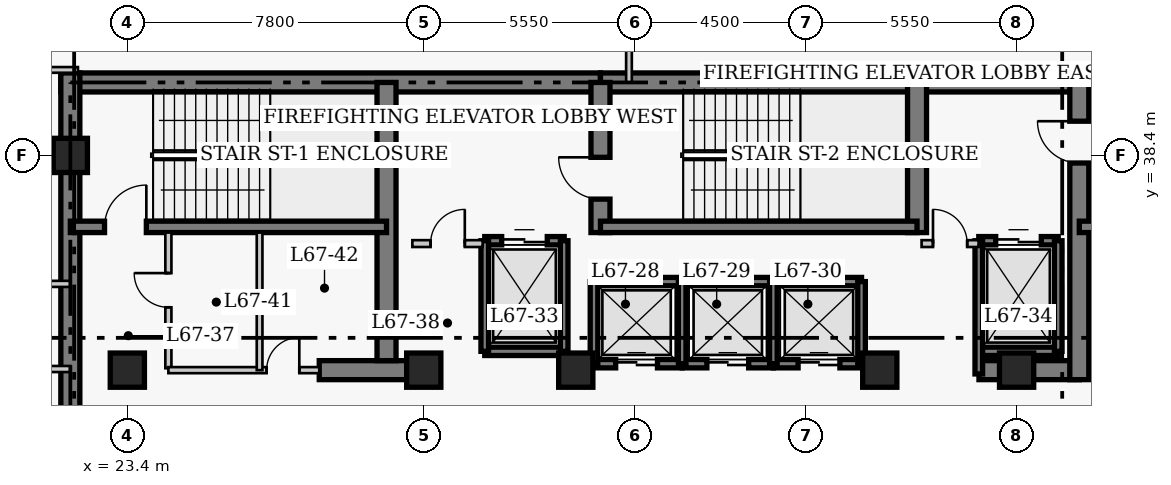
"""IFC4 building model, lengths in metres.
Left out: names, types, materials, properties, quantities, classifications, styles, units other than length and angle.
Written with IfcOpenShell. Run it as: python <this file> out.ifc"""

import sys

from ifc_helpers import new_model, si_unit, direction, frame, frame_2d, origin, origin_2d, place, context, subcontext, project, spatial, rectangle, extrude, element, fill, save


model = new_model("IFC4")
c1 = context("Model", 3, precision=1e-05, world=origin(), true_north=direction((0.0, 1.0)))
c2 = subcontext(c1, "Body", "Model", "MODEL_VIEW")
j1 = project(units=[si_unit("LENGTHUNIT", "METRE"), si_unit("PLANEANGLEUNIT", "RADIAN")], contexts=[c1])
p1 = place(None, origin())
s1 = spatial("IfcSite", under=j1, at=p1, CompositionType="ELEMENT")
p2 = place(p1, origin())
s2 = spatial("IfcBuilding", under=s1, at=p2, CompositionType="ELEMENT")
p3 = place(p2, frame((0.0, 0.0, 269.4)))
s3 = spatial("IfcBuildingStorey", under=s2, at=p3, CompositionType="ELEMENT", Elevation=269.4)
p4 = place(p3, frame((21.65, 40.32, 0.0), z_axis=(0.0, 0.0, 1.0), x_axis=(1.0, 0.0, 0.0)))
e1 = element("IfcWall", 1, at=p4, inside=s3, PredefinedType="SHEAR", context=c2, shape_type="SweptSolid", body=[
    extrude(rectangle(XDim=14.2, YDim=0.5, at=frame_2d((7.1, 0.0))), origin(), (0.0, 0.0, 1.0), 4.0),
])
p5 = place(p3, frame((35.85, 40.32, 0.0), z_axis=(0.0, 0.0, 1.0), x_axis=(1.0, 0.0, 0.0)))
e2 = element("IfcWall", 2, at=p5, inside=s3, PredefinedType="SHEAR", context=c2, shape_type="SweptSolid", body=[
    extrude(rectangle(XDim=12.6, YDim=0.5, at=frame_2d((6.3, 0.0))), origin(), (0.0, 0.0, 1.0), 4.0),
])
p6 = place(p3, frame((48.45, 40.32, 0.0), z_axis=(0.0, 0.0, 1.0), x_axis=(1.0, 0.0, 0.0)))
e3 = element("IfcWall", 3, at=p6, inside=s3, PredefinedType="SHEAR", context=c2, shape_type="SweptSolid", body=[
    extrude(rectangle(XDim=8.57, YDim=0.5, at=frame_2d((4.285, 0.0))), origin(), (0.0, 0.0, 1.0), 4.0),
])
p7 = place(p3, frame((21.9, 27.05, 0.0), z_axis=(0.0, 0.0, 1.0), x_axis=(0.0, 1.0, 0.0)))
e4 = element("IfcWall", 4, at=p7, inside=s3, PredefinedType="SHEAR", context=c2, shape_type="SweptSolid", body=[
    extrude(rectangle(XDim=13.52, YDim=0.5, at=frame_2d((6.76, 0.0))), origin(), (0.0, 0.0, 1.0), 4.0),
])
p8 = place(p3, frame((28.45, 32.75, 0.0), z_axis=(0.0, 0.0, 1.0), x_axis=(1.0, 0.0, 0.0)))
e5 = element("IfcWall", 5, at=p8, inside=s3, PredefinedType="SHEAR", context=c2, shape_type="SweptSolid", body=[
    extrude(rectangle(XDim=2.4, YDim=0.5, at=frame_2d((1.2, 0.0))), origin(), (0.0, 0.0, 1.0), 4.0),
])
p9 = place(p3, frame((45.81, 32.75, 0.0), z_axis=(0.0, 0.0, 1.0), x_axis=(1.0, 0.0, 0.0)))
e6 = element("IfcWall", 6, at=p9, inside=s3, PredefinedType="SHEAR", context=c2, shape_type="SweptSolid", body=[
    extrude(rectangle(XDim=2.64, YDim=0.5, at=frame_2d((1.32, 0.0))), origin(), (0.0, 0.0, 1.0), 4.0),
])
p10 = place(p3, frame((30.22, 33.0, 0.0), z_axis=(0.0, 0.0, 1.0), x_axis=(0.0, 1.0, 0.0)))
e7 = element("IfcWall", 7, at=p10, inside=s3, PredefinedType="SHEAR", context=c2, shape_type="SweptSolid", body=[
    extrude(rectangle(XDim=7.32, YDim=0.5, at=frame_2d((3.66, 0.0))), origin(), (0.0, 0.0, 1.0), 4.0),
])
p11 = place(p3, frame((35.85, 36.37, 0.0), z_axis=(0.0, 0.0, 1.0), x_axis=(0.0, 1.0, 0.0)))
e8 = element("IfcWall", 8, at=p11, inside=s3, PredefinedType="SHEAR", context=c2, shape_type="SweptSolid", body=[
    extrude(rectangle(XDim=3.95, YDim=0.5, at=frame_2d((1.975, 0.0))), origin(), (0.0, 0.0, 1.0), 4.0),
])
p12 = place(p11, frame((0.88, 0.0, 0.0)))
e9 = element("IfcOpeningElement", 9, at=p12, cuts=e8, PredefinedType="OPENING", context=c2, shape_type="SweptSolid", body=[
    extrude(rectangle(XDim=1.1, YDim=2.15, at=frame_2d((0.55, 1.075))), frame((0.0, 0.26, 0.0), z_axis=(0.0, -1.0, 0.0), x_axis=(1.0, 0.0, 0.0)), (0.0, 0.0, 1.0), 0.52),
])
p13 = place(p3, frame((44.18, 36.37, 0.0), z_axis=(0.0, 0.0, 1.0), x_axis=(0.0, 1.0, 0.0)))
e10 = element("IfcWall", 10, at=p13, inside=s3, PredefinedType="SHEAR", context=c2, shape_type="SweptSolid", body=[
    extrude(rectangle(XDim=3.95, YDim=0.5, at=frame_2d((1.975, 0.0))), origin(), (0.0, 0.0, 1.0), 4.0),
])
p14 = place(p3, frame((48.45, 32.5, 0.0), z_axis=(0.0, 0.0, 1.0), x_axis=(0.0, 1.0, 0.0)))
e11 = element("IfcWall", 11, at=p14, inside=s3, PredefinedType="SHEAR", context=c2, shape_type="SweptSolid", body=[
    extrude(rectangle(XDim=7.82, YDim=0.5, at=frame_2d((3.91, 0.0))), origin(), (0.0, 0.0, 1.0), 4.0),
])
p15 = place(p14, frame((5.7, 0.0, 0.0)))
e12 = element("IfcOpeningElement", 12, at=p15, cuts=e11, PredefinedType="OPENING", context=c2, shape_type="SweptSolid", body=[
    extrude(rectangle(XDim=1.1, YDim=2.15, at=frame_2d((0.55, 1.075))), frame((0.0, 0.26, 0.0), z_axis=(0.0, -1.0, 0.0), x_axis=(1.0, 0.0, 0.0)), (0.0, 0.0, 1.0), 0.52),
])
p16 = place(p3, frame((21.9, 36.52, 0.0), z_axis=(0.0, 0.0, 1.0), x_axis=(1.0, 0.0, 0.0)))
e13 = element("IfcWall", 13, at=p16, inside=s3, PredefinedType="SHEAR", context=c2, shape_type="SweptSolid", body=[
    extrude(rectangle(XDim=8.32, YDim=0.3, at=frame_2d((4.16, 0.0))), origin(), (0.0, 0.0, 1.0), 4.0),
])
p17 = place(p16, frame((0.9, 0.0, 0.0)))
e14 = element("IfcOpeningElement", 14, at=p17, cuts=e13, PredefinedType="OPENING", context=c2, shape_type="SweptSolid", body=[
    extrude(rectangle(XDim=1.1, YDim=2.15, at=frame_2d((0.55, 1.075))), frame((0.0, 0.16, 0.0), z_axis=(0.0, -1.0, 0.0), x_axis=(1.0, 0.0, 0.0)), (0.0, 0.0, 1.0), 0.32),
])
p18 = place(p3, frame((35.85, 36.52, 0.0), z_axis=(0.0, 0.0, 1.0), x_axis=(1.0, 0.0, 0.0)))
e15 = element("IfcWall", 15, at=p18, inside=s3, PredefinedType="SHEAR", context=c2, shape_type="SweptSolid", body=[
    extrude(rectangle(XDim=8.33, YDim=0.3, at=frame_2d((4.165, 0.0))), origin(), (0.0, 0.0, 1.0), 4.0),
])
p19 = place(p3, frame((48.45, 36.52, 0.0), z_axis=(0.0, 0.0, 1.0), x_axis=(1.0, 0.0, 0.0)))
e16 = element("IfcWall", 16, at=p19, inside=s3, PredefinedType="SHEAR", context=c2, shape_type="SweptSolid", body=[
    extrude(rectangle(XDim=8.32, YDim=0.3, at=frame_2d((4.16, 0.0))), origin(), (0.0, 0.0, 1.0), 4.0),
])
for number, where, z_axis, x_axis in (
    (17, (21.9, 38.4, 0.0), (0.0, 0.0, 1.0), (1.0, 0.0, 0.0)),
    (18, (23.4, 32.75, 0.0), (0.0, 0.0, 1.0), (1.0, 0.0, 0.0)),
    (19, (31.2, 32.75, 0.0), (0.0, 0.0, 1.0), (1.0, 0.0, 0.0)),
    (20, (35.2, 32.75, 0.0), (0.0, 0.0, 1.0), (1.0, 0.0, 0.0)),
    (21, (43.2, 32.75, 0.0), (0.0, 0.0, 1.0), (1.0, 0.0, 0.0)),
    (22, (46.8, 32.75, 0.0), (0.0, 0.0, 1.0), (1.0, 0.0, 0.0)),
):
    element("IfcColumn", number, at=place(p3, frame(where, z_axis=z_axis, x_axis=x_axis)), inside=s3, PredefinedType="COLUMN", context=c2, shape_type="SweptSolid", body=[
        extrude(rectangle(XDim=0.9, YDim=0.9, at=origin_2d()), origin(), (0.0, 0.0, 1.0), 4.0),
    ])
p20 = place(p3, frame((35.68, 35.08, 0.0), z_axis=(0.0, 0.0, 1.0), x_axis=(1.0, 0.0, 0.0)))
e23 = element("IfcWall", 23, at=p20, inside=s3, PredefinedType="SHEAR", context=c2, shape_type="SweptSolid", body=[
    extrude(rectangle(XDim=2.32, YDim=0.22, at=frame_2d((1.16, 0.0))), origin(), (0.0, 0.0, 1.0), 4.0),
])
p21 = place(p3, frame((35.68, 32.92, 0.0), z_axis=(0.0, 0.0, 1.0), x_axis=(1.0, 0.0, 0.0)))
e24 = element("IfcWall", 24, at=p21, inside=s3, PredefinedType="SHEAR", context=c2, shape_type="SweptSolid", body=[
    extrude(rectangle(XDim=2.32, YDim=0.22, at=frame_2d((1.16, 0.0))), origin(), (0.0, 0.0, 1.0), 4.0),
])
p22 = place(p21, frame((0.57, 0.0, 0.0)))
e25 = element("IfcOpeningElement", 25, at=p22, cuts=e24, PredefinedType="OPENING", context=c2, shape_type="SweptSolid", body=[
    extrude(rectangle(XDim=1.1, YDim=2.15, at=frame_2d((0.55, 1.075))), frame((0.0, 0.12, 0.0), z_axis=(0.0, -1.0, 0.0), x_axis=(1.0, 0.0, 0.0)), (0.0, 0.0, 1.0), 0.24),
])
p23 = place(p3, frame((35.68, 32.92, 0.0), z_axis=(0.0, 0.0, 1.0), x_axis=(0.0, 1.0, 0.0)))
e26 = element("IfcWall", 26, at=p23, inside=s3, PredefinedType="SHEAR", context=c2, shape_type="SweptSolid", body=[
    extrude(rectangle(XDim=2.16, YDim=0.2, at=frame_2d((1.08, 0.0))), origin(), (0.0, 0.0, 1.0), 4.0),
])
p24 = place(p3, frame((38.0, 35.08, 0.0), z_axis=(0.0, 0.0, 1.0), x_axis=(1.0, 0.0, 0.0)))
e27 = element("IfcWall", 27, at=p24, inside=s3, PredefinedType="SHEAR", context=c2, shape_type="SweptSolid", body=[
    extrude(rectangle(XDim=2.4, YDim=0.22, at=frame_2d((1.2, 0.0))), origin(), (0.0, 0.0, 1.0), 4.0),
])
p25 = place(p3, frame((38.0, 32.92, 0.0), z_axis=(0.0, 0.0, 1.0), x_axis=(1.0, 0.0, 0.0)))
e28 = element("IfcWall", 28, at=p25, inside=s3, PredefinedType="SHEAR", context=c2, shape_type="SweptSolid", body=[
    extrude(rectangle(XDim=2.4, YDim=0.22, at=frame_2d((1.2, 0.0))), origin(), (0.0, 0.0, 1.0), 4.0),
])
p26 = place(p25, frame((0.65, 0.0, 0.0)))
e29 = element("IfcOpeningElement", 29, at=p26, cuts=e28, PredefinedType="OPENING", context=c2, shape_type="SweptSolid", body=[
    extrude(rectangle(XDim=1.1, YDim=2.15, at=frame_2d((0.55, 1.075))), frame((0.0, 0.12, 0.0), z_axis=(0.0, -1.0, 0.0), x_axis=(1.0, 0.0, 0.0)), (0.0, 0.0, 1.0), 0.24),
])
p27 = place(p3, frame((38.0, 32.92, 0.0), z_axis=(0.0, 0.0, 1.0), x_axis=(0.0, 1.0, 0.0)))
e30 = element("IfcWall", 30, at=p27, inside=s3, PredefinedType="SHEAR", context=c2, shape_type="SweptSolid", body=[
    extrude(rectangle(XDim=2.16, YDim=0.2, at=frame_2d((1.08, 0.0))), origin(), (0.0, 0.0, 1.0), 4.0),
])
p28 = place(p3, frame((40.4, 35.08, 0.0), z_axis=(0.0, 0.0, 1.0), x_axis=(1.0, 0.0, 0.0)))
e31 = element("IfcWall", 31, at=p28, inside=s3, PredefinedType="SHEAR", context=c2, shape_type="SweptSolid", body=[
    extrude(rectangle(XDim=2.32, YDim=0.22, at=frame_2d((1.16, 0.0))), origin(), (0.0, 0.0, 1.0), 4.0),
])
p29 = place(p3, frame((40.4, 32.92, 0.0), z_axis=(0.0, 0.0, 1.0), x_axis=(1.0, 0.0, 0.0)))
e32 = element("IfcWall", 32, at=p29, inside=s3, PredefinedType="SHEAR", context=c2, shape_type="SweptSolid", body=[
    extrude(rectangle(XDim=2.32, YDim=0.22, at=frame_2d((1.16, 0.0))), origin(), (0.0, 0.0, 1.0), 4.0),
])
p30 = place(p29, frame((0.65, 0.0, 0.0)))
e33 = element("IfcOpeningElement", 33, at=p30, cuts=e32, PredefinedType="OPENING", context=c2, shape_type="SweptSolid", body=[
    extrude(rectangle(XDim=1.1, YDim=2.15, at=frame_2d((0.55, 1.075))), frame((0.0, 0.12, 0.0), z_axis=(0.0, -1.0, 0.0), x_axis=(1.0, 0.0, 0.0)), (0.0, 0.0, 1.0), 0.24),
])
for number, where, z_axis, x_axis in (
    (34, (40.4, 32.92, 0.0), (0.0, 0.0, 1.0), (0.0, 1.0, 0.0)),
    (35, (42.72, 32.92, 0.0), (0.0, 0.0, 1.0), (0.0, 1.0, 0.0)),
):
    element("IfcWall", number, at=place(p3, frame(where, z_axis=z_axis, x_axis=x_axis)), inside=s3, PredefinedType="SHEAR", context=c2, shape_type="SweptSolid", body=[
        extrude(rectangle(XDim=2.16, YDim=0.2, at=frame_2d((1.08, 0.0))), origin(), (0.0, 0.0, 1.0), 4.0),
    ])
p31 = place(p3, frame((32.805, 36.155, 0.0), z_axis=(0.0, 0.0, 1.0), x_axis=(1.0, 0.0, 0.0)))
e36 = element("IfcWall", 36, at=p31, inside=s3, PredefinedType="SHEAR", context=c2, shape_type="SweptSolid", body=[
    extrude(rectangle(XDim=2.09, YDim=0.22, at=frame_2d((1.045, 0.0))), origin(), (0.0, 0.0, 1.0), 4.0),
])
p32 = place(p31, frame((0.445, 0.0, 0.0)))
e37 = element("IfcOpeningElement", 37, at=p32, cuts=e36, PredefinedType="OPENING", context=c2, shape_type="SweptSolid", body=[
    extrude(rectangle(XDim=1.2, YDim=2.15, at=frame_2d((0.6, 1.075))), frame((0.0, 0.12, 0.0), z_axis=(0.0, -1.0, 0.0), x_axis=(1.0, 0.0, 0.0)), (0.0, 0.0, 1.0), 0.24),
])
p33 = place(p3, frame((32.805, 33.245, 0.0), z_axis=(0.0, 0.0, 1.0), x_axis=(1.0, 0.0, 0.0)))
e38 = element("IfcWall", 38, at=p33, inside=s3, PredefinedType="SHEAR", context=c2, shape_type="SweptSolid", body=[
    extrude(rectangle(XDim=2.09, YDim=0.22, at=frame_2d((1.045, 0.0))), origin(), (0.0, 0.0, 1.0), 4.0),
])
for number, where, z_axis, x_axis in (
    (39, (32.805, 33.245, 0.0), (0.0, 0.0, 1.0), (0.0, 1.0, 0.0)),
    (40, (34.895, 33.245, 0.0), (0.0, 0.0, 1.0), (0.0, 1.0, 0.0)),
):
    element("IfcWall", number, at=place(p3, frame(where, z_axis=z_axis, x_axis=x_axis)), inside=s3, PredefinedType="SHEAR", context=c2, shape_type="SweptSolid", body=[
        extrude(rectangle(XDim=2.91, YDim=0.2, at=frame_2d((1.455, 0.0))), origin(), (0.0, 0.0, 1.0), 4.0),
    ])
p34 = place(p3, frame((45.805, 36.155, 0.0), z_axis=(0.0, 0.0, 1.0), x_axis=(1.0, 0.0, 0.0)))
e41 = element("IfcWall", 41, at=p34, inside=s3, PredefinedType="SHEAR", context=c2, shape_type="SweptSolid", body=[
    extrude(rectangle(XDim=2.09, YDim=0.22, at=frame_2d((1.045, 0.0))), origin(), (0.0, 0.0, 1.0), 4.0),
])
p35 = place(p34, frame((0.445, 0.0, 0.0)))
e42 = element("IfcOpeningElement", 42, at=p35, cuts=e41, PredefinedType="OPENING", context=c2, shape_type="SweptSolid", body=[
    extrude(rectangle(XDim=1.2, YDim=2.15, at=frame_2d((0.6, 1.075))), frame((0.0, 0.12, 0.0), z_axis=(0.0, -1.0, 0.0), x_axis=(1.0, 0.0, 0.0)), (0.0, 0.0, 1.0), 0.24),
])
p36 = place(p3, frame((45.805, 33.245, 0.0), z_axis=(0.0, 0.0, 1.0), x_axis=(1.0, 0.0, 0.0)))
e43 = element("IfcWall", 43, at=p36, inside=s3, PredefinedType="SHEAR", context=c2, shape_type="SweptSolid", body=[
    extrude(rectangle(XDim=2.09, YDim=0.22, at=frame_2d((1.045, 0.0))), origin(), (0.0, 0.0, 1.0), 4.0),
])
p37 = place(p3, frame((45.805, 32.65, 0.0), z_axis=(0.0, 0.0, 1.0), x_axis=(0.0, 1.0, 0.0)))
e44 = element("IfcWall", 44, at=p37, inside=s3, PredefinedType="SHEAR", context=c2, shape_type="SweptSolid", body=[
    extrude(rectangle(XDim=3.505, YDim=0.2, at=frame_2d((1.752, 0.0))), origin(), (0.0, 0.0, 1.0), 4.0),
])
p38 = place(p3, frame((47.895, 33.245, 0.0), z_axis=(0.0, 0.0, 1.0), x_axis=(0.0, 1.0, 0.0)))
e45 = element("IfcWall", 45, at=p38, inside=s3, PredefinedType="SHEAR", context=c2, shape_type="SweptSolid", body=[
    extrude(rectangle(XDim=2.91, YDim=0.2, at=frame_2d((1.455, 0.0))), origin(), (0.0, 0.0, 1.0), 4.0),
])
p39 = place(p3, frame((30.9, 36.08, 0.0), z_axis=(0.0, 0.0, 1.0), x_axis=(1.0, 0.0, 0.0)))
e46 = element("IfcWall", 46, at=p39, inside=s3, PredefinedType="PARTITIONING", context=c2, shape_type="SweptSolid", body=[
    extrude(rectangle(XDim=1.85, YDim=0.18, at=frame_2d((0.925, 0.0))), origin(), (0.0, 0.0, 1.0), 3.76),
])
p40 = place(p39, frame((0.48, 0.0, 0.0)))
e47 = element("IfcOpeningElement", 47, at=p40, cuts=e46, PredefinedType="OPENING", context=c2, shape_type="SweptSolid", body=[
    extrude(rectangle(XDim=0.9, YDim=2.15, at=frame_2d((0.45, 1.075))), frame((0.0, 0.1, 0.0), z_axis=(0.0, -1.0, 0.0), x_axis=(1.0, 0.0, 0.0)), (0.0, 0.0, 1.0), 0.2),
])
p41 = place(p3, frame((44.3, 36.08, 0.0), z_axis=(0.0, 0.0, 1.0), x_axis=(1.0, 0.0, 0.0)))
e48 = element("IfcWall", 48, at=p41, inside=s3, PredefinedType="PARTITIONING", context=c2, shape_type="SweptSolid", body=[
    extrude(rectangle(XDim=1.5, YDim=0.18, at=frame_2d((0.75, 0.0))), origin(), (0.0, 0.0, 1.0), 3.76),
])
p42 = place(p41, frame((0.3, 0.0, 0.0)))
e49 = element("IfcOpeningElement", 49, at=p42, cuts=e48, PredefinedType="OPENING", context=c2, shape_type="SweptSolid", body=[
    extrude(rectangle(XDim=0.9, YDim=2.15, at=frame_2d((0.45, 1.075))), frame((0.0, 0.1, 0.0), z_axis=(0.0, -1.0, 0.0), x_axis=(1.0, 0.0, 0.0)), (0.0, 0.0, 1.0), 0.2),
])
p43 = place(p3, frame((24.48, 32.8, 0.0), z_axis=(0.0, 0.0, 1.0), x_axis=(0.0, 1.0, 0.0)))
e50 = element("IfcWall", 50, at=p43, inside=s3, PredefinedType="PARTITIONING", context=c2, shape_type="SweptSolid", body=[
    extrude(rectangle(XDim=3.57, YDim=0.16, at=frame_2d((1.785, 0.0))), origin(), (0.0, 0.0, 1.0), 3.76),
])
p44 = place(p43, frame((1.604, 0.0, 0.0)))
e51 = element("IfcOpeningElement", 51, at=p44, cuts=e50, PredefinedType="OPENING", context=c2, shape_type="SweptSolid", body=[
    extrude(rectangle(XDim=0.9, YDim=2.1, at=frame_2d((0.45, 1.05))), frame((0.0, 0.09, 0.0), z_axis=(0.0, -1.0, 0.0), x_axis=(1.0, 0.0, 0.0)), (0.0, 0.0, 1.0), 0.18),
])
p45 = place(p3, frame((24.48, 32.75, 0.0), z_axis=(0.0, 0.0, 1.0), x_axis=(1.0, 0.0, 0.0)))
e52 = element("IfcWall", 52, at=p45, inside=s3, PredefinedType="PARTITIONING", context=c2, shape_type="SweptSolid", body=[
    extrude(rectangle(XDim=3.97, YDim=0.16, at=frame_2d((1.985, 0.0))), origin(), (0.0, 0.0, 1.0), 3.76),
])
p46 = place(p45, frame((2.585, 0.0, 0.0)))
e53 = element("IfcOpeningElement", 53, at=p46, cuts=e52, PredefinedType="OPENING", context=c2, shape_type="SweptSolid", body=[
    extrude(rectangle(XDim=0.86, YDim=2.05, at=frame_2d((0.43, 1.025))), frame((0.0, 0.09, 0.0), z_axis=(0.0, -1.0, 0.0), x_axis=(1.0, 0.0, 0.0)), (0.0, 0.0, 1.0), 0.18),
])
p47 = place(p3, frame((26.88, 32.75, 0.0), z_axis=(0.0, 0.0, 1.0), x_axis=(0.0, 1.0, 0.0)))
e54 = element("IfcWall", 54, at=p47, inside=s3, PredefinedType="PARTITIONING", context=c2, shape_type="SweptSolid", body=[
    extrude(rectangle(XDim=3.62, YDim=0.15, at=frame_2d((1.81, 0.0))), origin(), (0.0, 0.0, 1.0), 3.76),
])
for number, where, z_axis, x_axis in (
    (55, (19.16, 35.02, 0.0), (0.0, 0.0, 1.0), (1.0, 0.0, 0.0)),
    (56, (19.16, 32.78, 0.0), (0.0, 0.0, 1.0), (1.0, 0.0, 0.0)),
):
    element("IfcWall", number, at=place(p3, frame(where, z_axis=z_axis, x_axis=x_axis)), inside=s3, PredefinedType="PARTITIONING", context=c2, shape_type="SweptSolid", body=[
        extrude(rectangle(XDim=2.74, YDim=0.16, at=frame_2d((1.37, 0.0))), origin(), (0.0, 0.0, 1.0), 3.76),
    ])
p48 = place(p3, frame((16.94, 40.65, 0.0), z_axis=(0.0, 0.0, 1.0), x_axis=(1.0, 0.0, 0.0)))
e57 = element("IfcWall", 57, at=p48, inside=s3, PredefinedType="PARTITIONING", context=c2, shape_type="SweptSolid", body=[
    extrude(rectangle(XDim=5.16, YDim=0.15, at=frame_2d((2.58, 0.0))), origin(), (0.0, 0.0, 1.0), 3.76),
])
p49 = place(p48, frame((0.55, 0.0, 0.0)))
e58 = element("IfcOpeningElement", 58, at=p49, cuts=e57, PredefinedType="OPENING", context=c2, shape_type="SweptSolid", body=[
    extrude(rectangle(XDim=1.0, YDim=2.15, at=frame_2d((0.5, 1.075))), frame((0.0, 0.085, 0.0), z_axis=(0.0, -1.0, 0.0), x_axis=(1.0, 0.0, 0.0)), (0.0, 0.0, 1.0), 0.17),
])
p50 = place(p3, frame((36.6, 40.32, 0.0), z_axis=(0.0, 0.0, 1.0), x_axis=(0.0, 1.0, 0.0)))
e59 = element("IfcWall", 59, at=p50, inside=s3, PredefinedType="PARTITIONING", context=c2, shape_type="SweptSolid", body=[
    extrude(rectangle(XDim=3.545, YDim=0.15, at=frame_2d((1.772, 0.0))), origin(), (0.0, 0.0, 1.0), 3.76),
])
p51 = place(p22, origin())
e60 = element("IfcDoor", 60, at=p51, inside=s3, OperationType="DOUBLE_DOOR_SLIDING", PredefinedType="DOOR", context=c2, shape_type="SweptSolid", body=[
    extrude(rectangle(XDim=1.1, YDim=2.15, at=frame_2d((0.55, 1.075))), frame((0.0, 0.025, 0.0), z_axis=(0.0, -1.0, 0.0), x_axis=(1.0, 0.0, 0.0)), (0.0, 0.0, 1.0), 0.05),
])
fill(e25, e60)
p52 = place(p26, origin())
e61 = element("IfcDoor", 61, at=p52, inside=s3, OperationType="DOUBLE_DOOR_SLIDING", PredefinedType="DOOR", context=c2, shape_type="SweptSolid", body=[
    extrude(rectangle(XDim=1.1, YDim=2.15, at=frame_2d((0.55, 1.075))), frame((0.0, 0.025, 0.0), z_axis=(0.0, -1.0, 0.0), x_axis=(1.0, 0.0, 0.0)), (0.0, 0.0, 1.0), 0.05),
])
fill(e29, e61)
p53 = place(p30, origin())
e62 = element("IfcDoor", 62, at=p53, inside=s3, OperationType="DOUBLE_DOOR_SLIDING", PredefinedType="DOOR", context=c2, shape_type="SweptSolid", body=[
    extrude(rectangle(XDim=1.1, YDim=2.15, at=frame_2d((0.55, 1.075))), frame((0.0, 0.025, 0.0), z_axis=(0.0, -1.0, 0.0), x_axis=(1.0, 0.0, 0.0)), (0.0, 0.0, 1.0), 0.05),
])
fill(e33, e62)
p54 = place(p32, origin())
e63 = element("IfcDoor", 63, at=p54, inside=s3, OperationType="DOUBLE_DOOR_SLIDING", PredefinedType="DOOR", context=c2, shape_type="SweptSolid", body=[
    extrude(rectangle(XDim=1.2, YDim=2.15, at=frame_2d((0.6, 1.075))), frame((0.0, 0.025, 0.0), z_axis=(0.0, -1.0, 0.0), x_axis=(1.0, 0.0, 0.0)), (0.0, 0.0, 1.0), 0.05),
])
fill(e37, e63)
p55 = place(p35, origin())
e64 = element("IfcDoor", 64, at=p55, inside=s3, OperationType="DOUBLE_DOOR_SLIDING", PredefinedType="DOOR", context=c2, shape_type="SweptSolid", body=[
    extrude(rectangle(XDim=1.2, YDim=2.15, at=frame_2d((0.6, 1.075))), frame((0.0, 0.025, 0.0), z_axis=(0.0, -1.0, 0.0), x_axis=(1.0, 0.0, 0.0)), (0.0, 0.0, 1.0), 0.05),
])
fill(e42, e64)
p56 = place(p40, origin())
e65 = element("IfcDoor", 65, at=p56, inside=s3, OperationType="SINGLE_SWING_RIGHT", PredefinedType="DOOR", context=c2, shape_type="SweptSolid", body=[
    extrude(rectangle(XDim=0.9, YDim=2.15, at=frame_2d((0.45, 1.075))), frame((0.0, 0.025, 0.0), z_axis=(0.0, -1.0, 0.0), x_axis=(1.0, 0.0, 0.0)), (0.0, 0.0, 1.0), 0.05),
])
fill(e47, e65)
p57 = place(p42, origin())
e66 = element("IfcDoor", 66, at=p57, inside=s3, OperationType="SINGLE_SWING_LEFT", PredefinedType="DOOR", context=c2, shape_type="SweptSolid", body=[
    extrude(rectangle(XDim=0.9, YDim=2.15, at=frame_2d((0.45, 1.075))), frame((0.0, 0.025, 0.0), z_axis=(0.0, -1.0, 0.0), x_axis=(1.0, 0.0, 0.0)), (0.0, 0.0, 1.0), 0.05),
])
fill(e49, e66)
p58 = place(p44, origin())
e67 = element("IfcDoor", 67, at=p58, inside=s3, OperationType="SINGLE_SWING_RIGHT", PredefinedType="DOOR", context=c2, shape_type="SweptSolid", body=[
    extrude(rectangle(XDim=0.9, YDim=2.1, at=frame_2d((0.45, 1.05))), frame((0.0, 0.025, 0.0), z_axis=(0.0, -1.0, 0.0), x_axis=(1.0, 0.0, 0.0)), (0.0, 0.0, 1.0), 0.05),
])
fill(e51, e67)
p59 = place(p46, origin())
e68 = element("IfcDoor", 68, at=p59, inside=s3, OperationType="SINGLE_SWING_RIGHT", PredefinedType="DOOR", context=c2, shape_type="SweptSolid", body=[
    extrude(rectangle(XDim=0.86, YDim=2.05, at=frame_2d((0.43, 1.025))), frame((0.0, 0.025, 0.0), z_axis=(0.0, -1.0, 0.0), x_axis=(1.0, 0.0, 0.0)), (0.0, 0.0, 1.0), 0.05),
])
fill(e53, e68)
p60 = place(p17, origin())
e69 = element("IfcDoor", 69, at=p60, inside=s3, OperationType="SINGLE_SWING_RIGHT", PredefinedType="DOOR", context=c2, shape_type="SweptSolid", body=[
    extrude(rectangle(XDim=1.1, YDim=2.15, at=frame_2d((0.55, 1.075))), frame((0.0, 0.025, 0.0), z_axis=(0.0, -1.0, 0.0), x_axis=(1.0, 0.0, 0.0)), (0.0, 0.0, 1.0), 0.05),
])
fill(e14, e69)
p61 = place(p12, origin())
e70 = element("IfcDoor", 70, at=p61, inside=s3, OperationType="SINGLE_SWING_RIGHT", PredefinedType="DOOR", context=c2, shape_type="SweptSolid", body=[
    extrude(rectangle(XDim=1.1, YDim=2.15, at=frame_2d((0.55, 1.075))), frame((0.0, 0.025, 0.0), z_axis=(0.0, -1.0, 0.0), x_axis=(1.0, 0.0, 0.0)), (0.0, 0.0, 1.0), 0.05),
])
fill(e9, e70)
p62 = place(p15, origin())
e71 = element("IfcDoor", 71, at=p62, inside=s3, OperationType="SINGLE_SWING_RIGHT", PredefinedType="DOOR", context=c2, shape_type="SweptSolid", body=[
    extrude(rectangle(XDim=1.1, YDim=2.15, at=frame_2d((0.55, 1.075))), frame((0.0, 0.025, 0.0), z_axis=(0.0, -1.0, 0.0), x_axis=(1.0, 0.0, 0.0)), (0.0, 0.0, 1.0), 0.05),
])
fill(e12, e71)
save(model, sys.argv[1])
